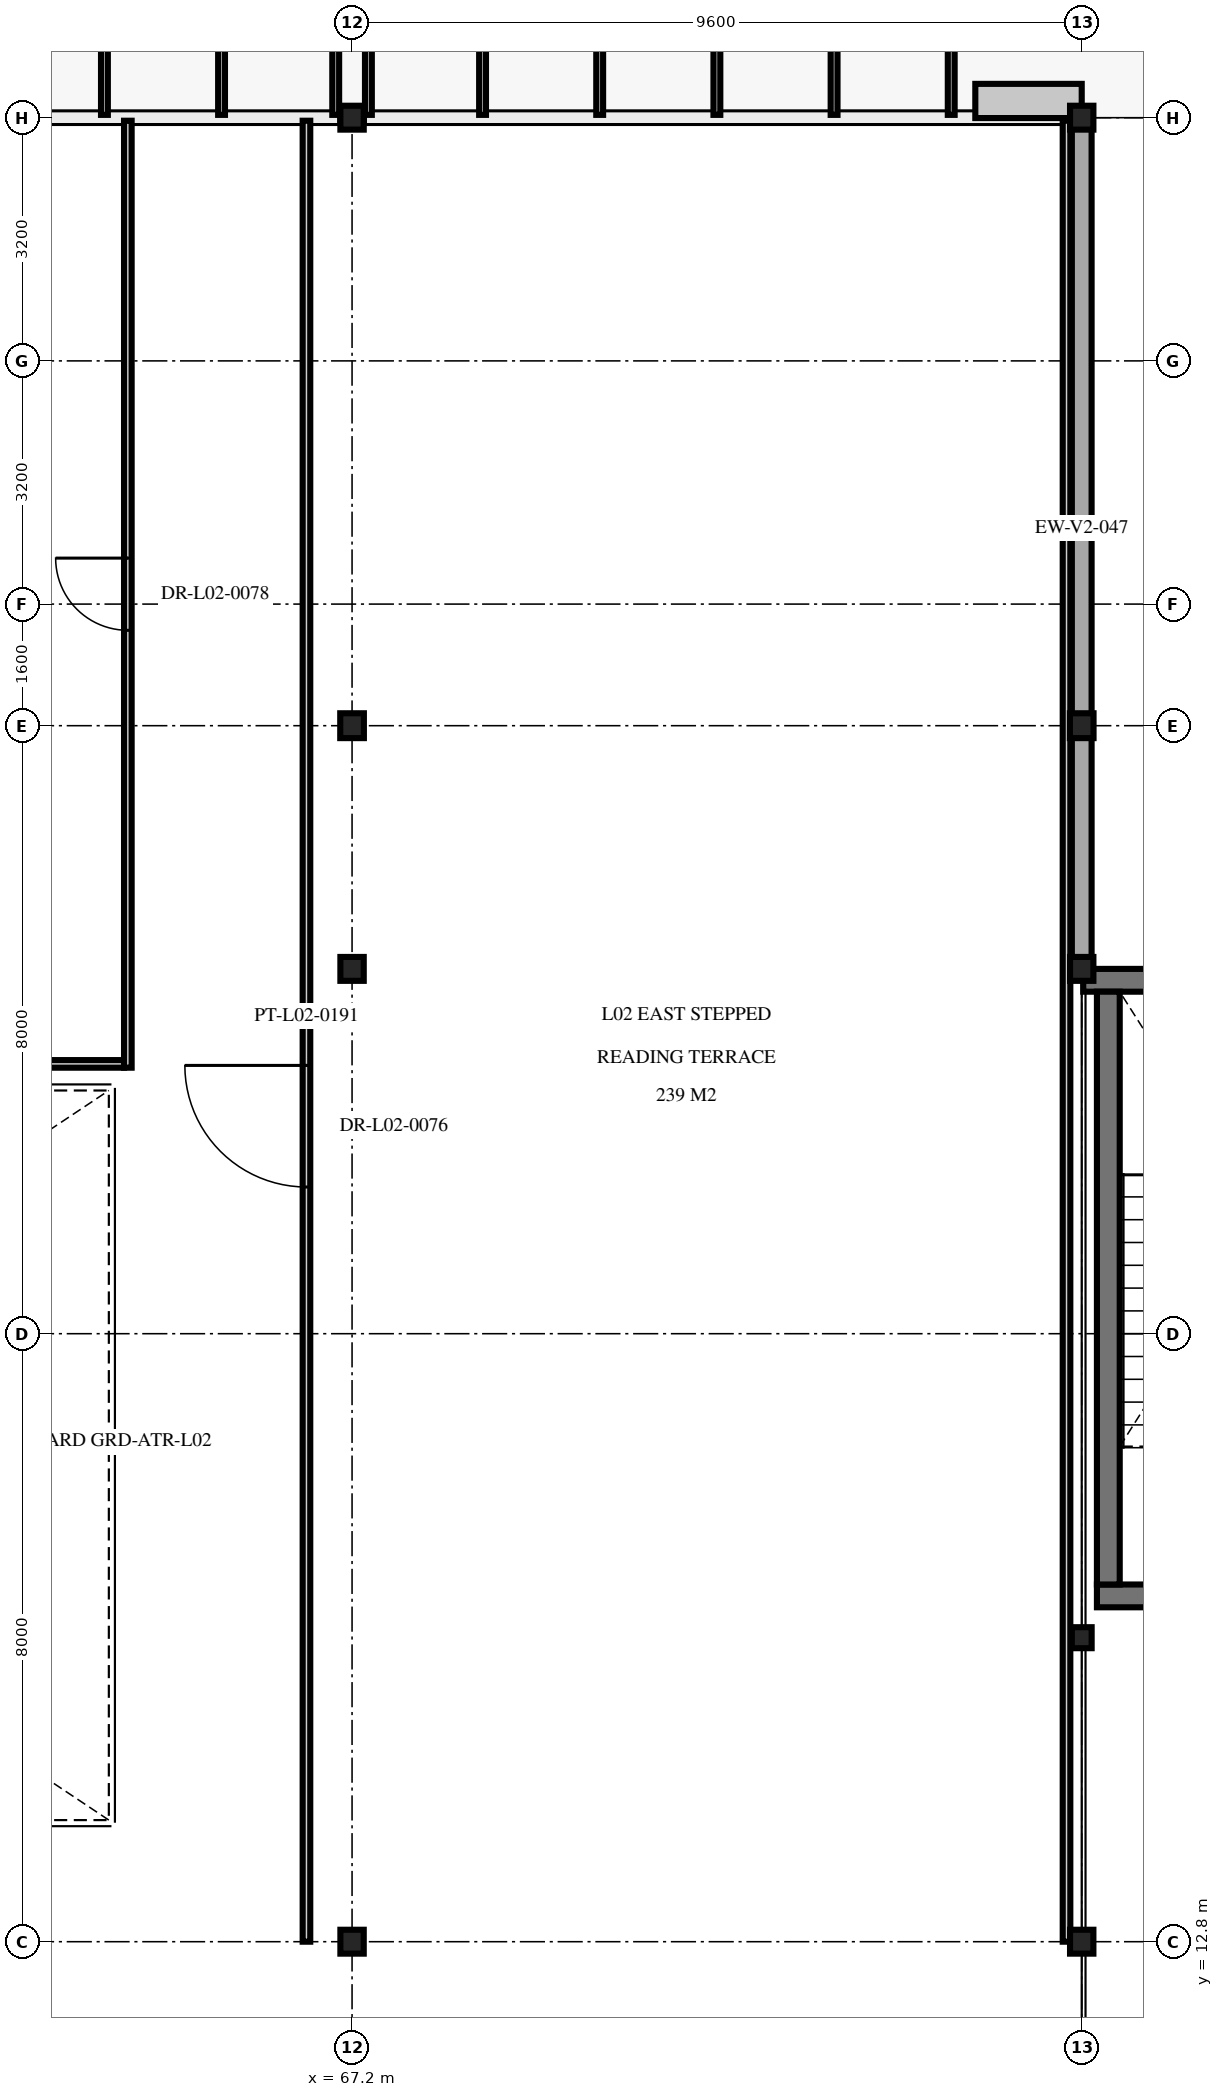
"""IFC4 building model, lengths in metres.
Left out: names, types, materials, properties, quantities, classifications, styles, units other than length and angle.
Written with IfcOpenShell. Run it as: python <this file> out.ifc"""

import sys

from ifc_helpers import new_model, si_unit, direction, frame, frame_2d, origin, origin_2d, place, context, subcontext, project, spatial, rectangle, i_section, extrude, element, fill, save


model = new_model("IFC4")
c1 = context("Model", 3, precision=1e-05, world=origin(), true_north=direction((0.0, 1.0)))
c2 = subcontext(c1, "Body", "Model", "MODEL_VIEW")
j1 = project(units=[si_unit("LENGTHUNIT", "METRE"), si_unit("PLANEANGLEUNIT", "RADIAN")], contexts=[c1])
p1 = place(None, origin())
s1 = spatial("IfcSite", under=j1, at=p1, CompositionType="ELEMENT")
p2 = place(p1, origin())
s2 = spatial("IfcBuilding", under=s1, at=p2, CompositionType="ELEMENT")
p3 = place(p2, frame((0.0, 0.0, 9.6)))
s3 = spatial("IfcBuildingStorey", under=s2, at=p3, CompositionType="ELEMENT", Elevation=9.6)
for number, where, z_axis, x_axis in (
    (1, (67.2, 12.8, 0.0), (0.0, 0.0, 1.0), (1.0, 0.0, 0.0)),
    (2, (67.2, 25.6, 0.0), (0.0, 0.0, 1.0), (1.0, 0.0, 0.0)),
    (3, (67.2, 36.8, 0.0), (0.0, 0.0, 1.0), (1.0, 0.0, 0.0)),
    (4, (76.8, 12.8, 0.0), (0.0, 0.0, 1.0), (1.0, 0.0, 0.0)),
    (5, (76.8, 25.6, 0.0), (0.0, 0.0, 1.0), (1.0, 0.0, 0.0)),
    (6, (76.8, 36.8, 0.0), (0.0, 0.0, 1.0), (1.0, 0.0, 0.0)),
):
    element("IfcColumn", number, at=place(p3, frame(where, z_axis=z_axis, x_axis=x_axis)), inside=s3, PredefinedType="COLUMN", context=c2, shape_type="SweptSolid", body=[
        extrude(i_section(OverallWidth=0.307, OverallDepth=0.314, WebThickness=0.012, FlangeThickness=0.019, at=origin_2d()), origin(), (0.0, 0.0, 1.0), 4.5),
    ])
for number, where, z_axis, x_axis in (
    (7, (67.2, 28.8, 0.0), (0.0, 0.0, 1.0), (1.0, 0.0, 0.0)),
    (8, (76.8, 28.8, 0.0), (0.0, 0.0, 1.0), (1.0, 0.0, 0.0)),
):
    element("IfcColumn", number, at=place(p3, frame(where, z_axis=z_axis, x_axis=x_axis)), inside=s3, PredefinedType="COLUMN", context=c2, shape_type="SweptSolid", body=[
        extrude(i_section(OverallWidth=0.311, OverallDepth=0.327, WebThickness=0.016, FlangeThickness=0.025, at=origin_2d()), origin(), (0.0, 0.0, 1.0), 4.5),
    ])
p4 = place(p3, frame((76.8, 16.8, 0.0), z_axis=(0.0, 0.0, 1.0), x_axis=(1.0, 0.0, 0.0)))
e9 = element("IfcColumn", 9, at=p4, inside=s3, PredefinedType="COLUMN", context=c2, shape_type="SweptSolid", body=[
    extrude(i_section(OverallWidth=0.261, OverallDepth=0.276, WebThickness=0.015, FlangeThickness=0.025, at=origin_2d()), origin(), (0.0, 0.0, 1.0), 4.5),
])
p5 = place(p3, frame((81.4, 17.35, 0.0), z_axis=(0.0, 0.0, 1.0), x_axis=(-1.0, 0.0, 0.0)))
e10 = element("IfcWall", 10, at=p5, inside=s3, PredefinedType="SHEAR", context=c2, shape_type="SweptSolid", body=[
    extrude(rectangle(XDim=4.4, YDim=0.3, at=frame_2d((2.2, 0.0))), origin(), (0.0, 0.0, 1.0), 4.26),
])
p6 = place(p5, frame((1.65, 0.0, 0.0)))
e11 = element("IfcOpeningElement", 11, at=p6, cuts=e10, PredefinedType="OPENING", context=c2, shape_type="SweptSolid", body=[
    extrude(rectangle(XDim=1.1, YDim=2.2, at=frame_2d((0.55, 1.1))), frame((0.0, 0.16, 0.0), z_axis=(0.0, -1.0, 0.0), x_axis=(1.0, 0.0, 0.0)), (0.0, 0.0, 1.0), 0.32),
])
p7 = place(p3, frame((76.82, 25.45, 0.0), z_axis=(0.0, 0.0, 1.0), x_axis=(1.0, 0.0, 0.0)))
e12 = element("IfcWall", 12, at=p7, inside=s3, PredefinedType="SHEAR", context=c2, shape_type="SweptSolid", body=[
    extrude(rectangle(XDim=4.76, YDim=0.3, at=frame_2d((2.38, 0.0))), origin(), (0.0, 0.0, 1.0), 4.26),
])
p8 = place(p3, frame((77.15, 17.5, 0.0), z_axis=(0.0, 0.0, 1.0), x_axis=(0.0, 1.0, 0.0)))
e13 = element("IfcWall", 13, at=p8, inside=s3, PredefinedType="SHEAR", context=c2, shape_type="SweptSolid", body=[
    extrude(rectangle(XDim=7.8, YDim=0.3, at=frame_2d((3.9, 0.0))), origin(), (0.0, 0.0, 1.0), 4.26),
])
p9 = place(p3, frame((76.8, 36.885, 0.0), z_axis=(0.0, 0.0, 1.0), x_axis=(0.0, -1.0, 0.0)))
e14 = element("IfcWall", 14, at=p9, inside=s3, PredefinedType="SOLIDWALL", context=c2, shape_type="SweptSolid", body=[
    extrude(rectangle(XDim=11.37, YDim=0.26, at=frame_2d((5.685, 0.0))), origin(), (0.0, 0.0, 1.0), 3.845),
])
p10 = place(p3, frame((66.6, 12.8, 0.0), z_axis=(0.0, 0.0, 1.0), x_axis=(0.0, 1.0, 0.0)))
e15 = element("IfcWall", 15, at=p10, inside=s3, PredefinedType="MOVABLE", context=c2, shape_type="SweptSolid", body=[
    extrude(rectangle(XDim=23.96, YDim=0.1, at=frame_2d((11.98, 0.0))), origin(), (0.0, 0.0, 1.0), 3.925),
])
p11 = place(p10, frame((9.93, 0.0, 0.0)))
e16 = element("IfcOpeningElement", 16, at=p11, cuts=e15, PredefinedType="OPENING", context=c2, shape_type="SweptSolid", body=[
    extrude(rectangle(XDim=1.6, YDim=2.25, at=frame_2d((0.8, 1.125))), frame((0.0, 0.06, 0.0), z_axis=(0.0, -1.0, 0.0), x_axis=(1.0, 0.0, 0.0)), (0.0, 0.0, 1.0), 0.12),
])
p12 = place(p3, frame((76.6, 12.8, 0.0), z_axis=(0.0, 0.0, 1.0), x_axis=(0.0, 1.0, 0.0)))
e17 = element("IfcWall", 17, at=p12, inside=s3, PredefinedType="MOVABLE", context=c2, shape_type="SweptSolid", body=[
    extrude(rectangle(XDim=23.96, YDim=0.1, at=frame_2d((11.98, 0.0))), origin(), (0.0, 0.0, 1.0), 3.925),
])
p13 = place(p3, frame((57.6, 24.35, 0.0), z_axis=(0.0, 0.0, 1.0), x_axis=(1.0, 0.0, 0.0)))
e18 = element("IfcWall", 18, at=p13, inside=s3, PredefinedType="MOVABLE", context=c2, shape_type="SweptSolid", body=[
    extrude(rectangle(XDim=6.6, YDim=0.1, at=frame_2d((3.3, 0.0))), origin(), (0.0, 0.0, 1.0), 4.26),
])
p14 = place(p3, frame((64.25, 24.3, 0.0), z_axis=(0.0, 0.0, 1.0), x_axis=(0.0, 1.0, 0.0)))
e19 = element("IfcWall", 19, at=p14, inside=s3, PredefinedType="MOVABLE", context=c2, shape_type="SweptSolid", body=[
    extrude(rectangle(XDim=12.46, YDim=0.1, at=frame_2d((6.23, 0.0))), origin(), (0.0, 0.0, 1.0), 3.925),
])
p15 = place(p14, frame((5.755, 0.0, 0.0)))
e20 = element("IfcOpeningElement", 20, at=p15, cuts=e19, PredefinedType="OPENING", context=c2, shape_type="SweptSolid", body=[
    extrude(rectangle(XDim=0.95, YDim=2.15, at=frame_2d((0.475, 1.075))), frame((0.0, 0.06, 0.0), z_axis=(0.0, -1.0, 0.0), x_axis=(1.0, 0.0, 0.0)), (0.0, 0.0, 1.0), 0.12),
])
p16 = place(p11, origin())
e21 = element("IfcDoor", 21, at=p16, inside=s3, OperationType="DOUBLE_DOOR_SINGLE_SWING", PredefinedType="DOOR", context=c2, shape_type="SweptSolid", body=[
    extrude(rectangle(XDim=1.6, YDim=2.25, at=frame_2d((0.8, 1.125))), frame((0.0, 0.025, 0.0), z_axis=(0.0, -1.0, 0.0), x_axis=(1.0, 0.0, 0.0)), (0.0, 0.0, 1.0), 0.05),
])
fill(e16, e21)
p17 = place(p15, origin())
e22 = element("IfcDoor", 22, at=p17, inside=s3, OperationType="SINGLE_SWING_RIGHT", PredefinedType="DOOR", context=c2, shape_type="SweptSolid", body=[
    extrude(rectangle(XDim=0.95, YDim=2.15, at=frame_2d((0.475, 1.075))), frame((0.0, 0.025, 0.0), z_axis=(0.0, -1.0, 0.0), x_axis=(1.0, 0.0, 0.0)), (0.0, 0.0, 1.0), 0.05),
])
fill(e20, e22)
save(model, sys.argv[1])
